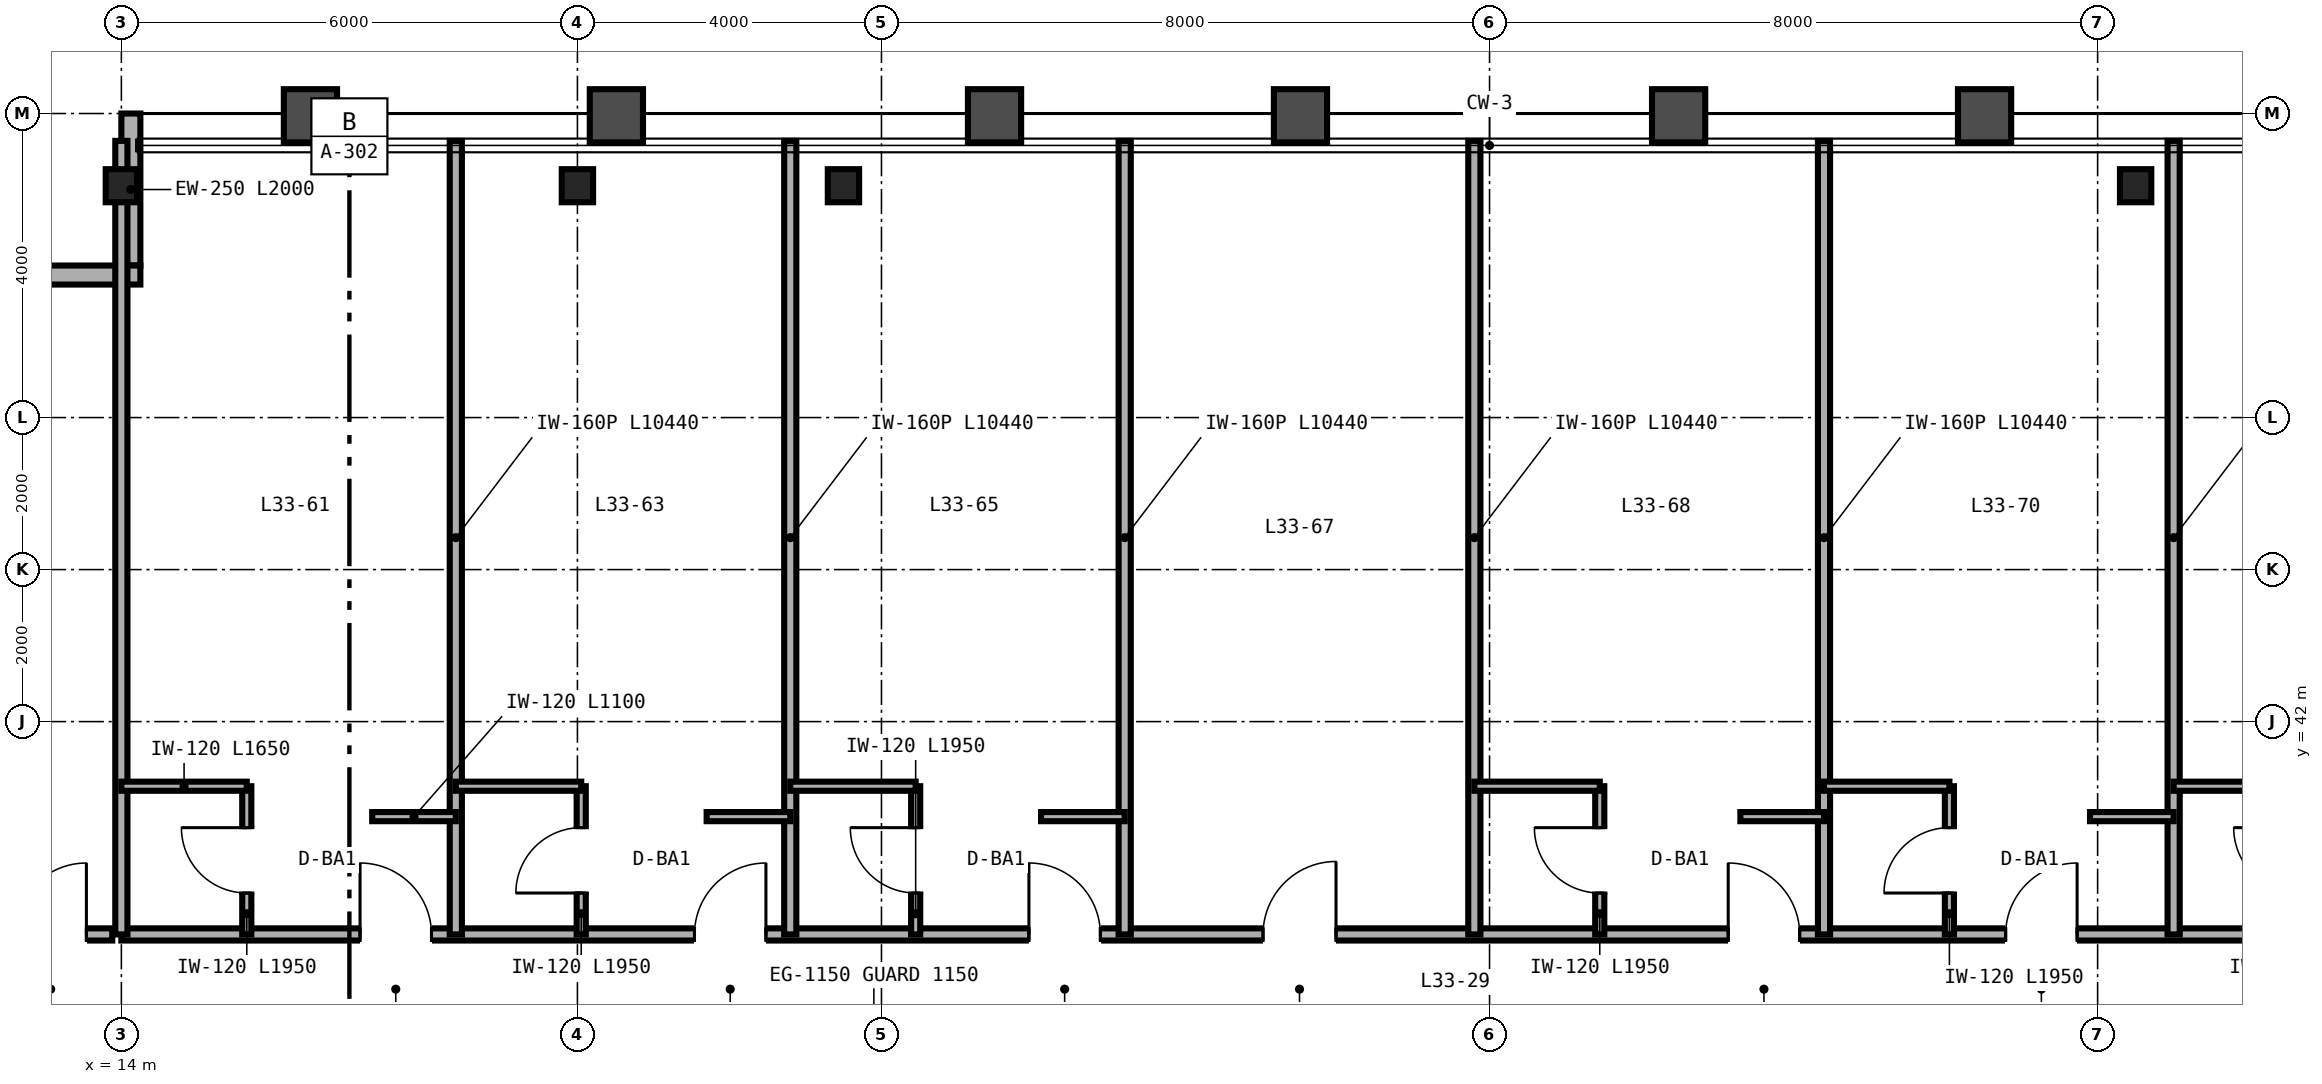
"""IFC4 building model, lengths in metres.
Left out: names, types, materials, properties, quantities, classifications, styles, units other than length and angle.
Written with IfcOpenShell. Run it as: python <this file> out.ifc"""

import sys

from ifc_helpers import new_model, si_unit, direction, frame, frame_2d, origin, origin_2d, place, context, subcontext, project, spatial, rectangle, i_section, extrude, source, transform, mapped, element, fill, save


model = new_model("IFC4")
c1 = context("Model", 3, precision=1e-05, world=origin(), true_north=direction((0.0, 1.0)))
c2 = subcontext(c1, "Body", "Model", "MODEL_VIEW")
j1 = project(units=[si_unit("LENGTHUNIT", "METRE"), si_unit("PLANEANGLEUNIT", "RADIAN")], contexts=[c1])
p1 = place(None, origin())
s1 = spatial("IfcSite", under=j1, at=p1, CompositionType="ELEMENT")
p2 = place(p1, origin())
s2 = spatial("IfcBuilding", under=s1, at=p2, CompositionType="ELEMENT")
p3 = place(p2, frame((0.0, 0.0, 133.2)))
s3 = spatial("IfcBuildingStorey", under=s2, at=p3, CompositionType="ELEMENT", Elevation=133.2)
m1 = source(origin(), c2, "Body", "SweptSolid", [
    extrude(i_section(OverallWidth=0.412, OverallDepth=0.435, WebThickness=0.036, FlangeThickness=0.057, FilletRadius=0.025, at=origin_2d()), origin(), (0.0, 0.0, 1.0), 3.36),
])
for number, where, z_axis, x_axis in (
    (1, (14.0, 49.05, 0.0), (0.0, 0.0, 1.0), (1.0, 0.0, 0.0)),
    (2, (20.0, 49.05, 0.0), (0.0, 0.0, 1.0), (1.0, 0.0, 0.0)),
    (3, (23.5, 49.05, 0.0), (0.0, 0.0, 1.0), (1.0, 0.0, 0.0)),
    (4, (40.5, 49.05, 0.0), (0.0, 0.0, 1.0), (1.0, 0.0, 0.0)),
):
    element("IfcColumn", number, at=place(p3, frame(where, z_axis=z_axis, x_axis=x_axis)), inside=s3, PredefinedType="COLUMN", context=c2, shape_type="MappedRepresentation", body=[
        mapped(m1, transform((0.0, 0.0, 0.0), scale=1.0)),
    ])
p4 = place(p3, frame((14.125, 50.0, 0.0), z_axis=(0.0, 0.0, 1.0), x_axis=(0.0, -1.0, 0.0)))
e5 = element("IfcWall", 5, at=p4, inside=s3, PredefinedType="SOLIDWALL", context=c2, shape_type="SweptSolid", body=[
    extrude(rectangle(XDim=2.0, YDim=0.25, at=frame_2d((1.0, 0.0))), origin(), (0.0, 0.0, 1.0), 2.667),
])
p5 = place(p3, frame((14.25, 47.875, 0.0), z_axis=(0.0, 0.0, 1.0), x_axis=(-1.0, 0.0, 0.0)))
e6 = element("IfcWall", 6, at=p5, inside=s3, PredefinedType="SOLIDWALL", context=c2, shape_type="SweptSolid", body=[
    extrude(rectangle(XDim=2.0, YDim=0.25, at=frame_2d((1.0, 0.0))), origin(), (0.0, 0.0, 1.0), 3.36),
])
p6 = place(p3, frame((8.2, 39.2, 0.0), z_axis=(0.0, 0.0, 1.0), x_axis=(1.0, 0.0, 0.0)))
e7 = element("IfcWall", 7, at=p6, inside=s3, PredefinedType="PARTITIONING", context=c2, shape_type="SweptSolid", body=[
    extrude(rectangle(XDim=5.68, YDim=0.16, at=frame_2d((2.84, 0.0))), origin(), (0.0, 0.0, 1.0), 3.36),
])
p7 = place(p6, frame((4.4, 0.0, 0.0)))
e8 = element("IfcOpeningElement", 8, at=p7, cuts=e7, PredefinedType="OPENING", context=c2, shape_type="SweptSolid", body=[
    extrude(rectangle(XDim=0.94, YDim=2.15, at=frame_2d((0.47, 1.075))), frame((0.0, 0.09, 0.0), z_axis=(0.0, -1.0, 0.0), x_axis=(1.0, 0.0, 0.0)), (0.0, 0.0, 1.0), 0.18),
])
p8 = place(p3, frame((14.0, 39.2, 0.0), z_axis=(0.0, 0.0, 1.0), x_axis=(1.0, 0.0, 0.0)))
e9 = element("IfcWall", 9, at=p8, inside=s3, PredefinedType="PARTITIONING", context=c2, shape_type="SweptSolid", body=[
    extrude(rectangle(XDim=36.0, YDim=0.16, at=frame_2d((18.0, 0.0))), origin(), (0.0, 0.0, 1.0), 2.581),
])
p9 = place(p8, frame((3.14, 0.0, 0.0)))
e10 = element("IfcOpeningElement", 10, at=p9, cuts=e9, PredefinedType="OPENING", context=c2, shape_type="SweptSolid", body=[
    extrude(rectangle(XDim=0.94, YDim=2.15, at=frame_2d((0.47, 1.075))), frame((0.0, 0.09, 0.0), z_axis=(0.0, -1.0, 0.0), x_axis=(1.0, 0.0, 0.0)), (0.0, 0.0, 1.0), 0.18),
])
p10 = place(p8, frame((7.54, 0.0, 0.0)))
e11 = element("IfcOpeningElement", 11, at=p10, cuts=e9, PredefinedType="OPENING", context=c2, shape_type="SweptSolid", body=[
    extrude(rectangle(XDim=0.94, YDim=2.15, at=frame_2d((0.47, 1.075))), frame((0.0, 0.09, 0.0), z_axis=(0.0, -1.0, 0.0), x_axis=(1.0, 0.0, 0.0)), (0.0, 0.0, 1.0), 0.18),
])
p11 = place(p8, frame((11.94, 0.0, 0.0)))
e12 = element("IfcOpeningElement", 12, at=p11, cuts=e9, PredefinedType="OPENING", context=c2, shape_type="SweptSolid", body=[
    extrude(rectangle(XDim=0.94, YDim=2.15, at=frame_2d((0.47, 1.075))), frame((0.0, 0.09, 0.0), z_axis=(0.0, -1.0, 0.0), x_axis=(1.0, 0.0, 0.0)), (0.0, 0.0, 1.0), 0.18),
])
p12 = place(p8, frame((15.02, 0.0, 0.0)))
e13 = element("IfcOpeningElement", 13, at=p12, cuts=e9, PredefinedType="OPENING", context=c2, shape_type="SweptSolid", body=[
    extrude(rectangle(XDim=0.96, YDim=2.15, at=frame_2d((0.48, 1.075))), frame((0.0, 0.09, 0.0), z_axis=(0.0, -1.0, 0.0), x_axis=(1.0, 0.0, 0.0)), (0.0, 0.0, 1.0), 0.18),
])
p13 = place(p8, frame((21.14, 0.0, 0.0)))
e14 = element("IfcOpeningElement", 14, at=p13, cuts=e9, PredefinedType="OPENING", context=c2, shape_type="SweptSolid", body=[
    extrude(rectangle(XDim=0.94, YDim=2.15, at=frame_2d((0.47, 1.075))), frame((0.0, 0.09, 0.0), z_axis=(0.0, -1.0, 0.0), x_axis=(1.0, 0.0, 0.0)), (0.0, 0.0, 1.0), 0.18),
])
p14 = place(p8, frame((24.79, 0.0, 0.0)))
e15 = element("IfcOpeningElement", 15, at=p14, cuts=e9, PredefinedType="OPENING", context=c2, shape_type="SweptSolid", body=[
    extrude(rectangle(XDim=0.94, YDim=2.15, at=frame_2d((0.47, 1.075))), frame((0.0, 0.09, 0.0), z_axis=(0.0, -1.0, 0.0), x_axis=(1.0, 0.0, 0.0)), (0.0, 0.0, 1.0), 0.18),
])
p15 = place(p8, frame((30.24, 0.0, 0.0)))
e16 = element("IfcOpeningElement", 16, at=p15, cuts=e9, PredefinedType="OPENING", context=c2, shape_type="SweptSolid", body=[
    extrude(rectangle(XDim=0.94, YDim=2.15, at=frame_2d((0.47, 1.075))), frame((0.0, 0.09, 0.0), z_axis=(0.0, -1.0, 0.0), x_axis=(1.0, 0.0, 0.0)), (0.0, 0.0, 1.0), 0.18),
])
p16 = place(p8, frame((34.74, 0.0, 0.0)))
e17 = element("IfcOpeningElement", 17, at=p16, cuts=e9, PredefinedType="OPENING", context=c2, shape_type="SweptSolid", body=[
    extrude(rectangle(XDim=0.94, YDim=2.15, at=frame_2d((0.47, 1.075))), frame((0.0, 0.09, 0.0), z_axis=(0.0, -1.0, 0.0), x_axis=(1.0, 0.0, 0.0)), (0.0, 0.0, 1.0), 0.18),
])
for number, where, z_axis, x_axis in (
    (18, (14.0, 39.2, 0.0), (0.0, 0.0, 1.0), (0.0, 1.0, 0.0)),
    (19, (18.4, 39.2, 0.0), (0.0, 0.0, 1.0), (0.0, 1.0, 0.0)),
):
    element("IfcWall", number, at=place(p3, frame(where, z_axis=z_axis, x_axis=x_axis)), inside=s3, PredefinedType="PARTITIONING", context=c2, shape_type="SweptSolid", body=[
        extrude(rectangle(XDim=10.44, YDim=0.16, at=frame_2d((5.22, 0.0))), origin(), (0.0, 0.0, 1.0), 2.667),
    ])
p17 = place(p3, frame((15.65, 39.2, 0.0), z_axis=(0.0, 0.0, 1.0), x_axis=(0.0, 1.0, 0.0)))
e20 = element("IfcWall", 20, at=p17, inside=s3, PredefinedType="PARTITIONING", context=c2, shape_type="SweptSolid", body=[
    extrude(rectangle(XDim=1.95, YDim=0.12, at=frame_2d((0.975, 0.0))), origin(), (0.0, 0.0, 1.0), 3.36),
])
p18 = place(p17, frame((0.545, 0.0, 0.0)))
e21 = element("IfcOpeningElement", 21, at=p18, cuts=e20, PredefinedType="OPENING", context=c2, shape_type="SweptSolid", body=[
    extrude(rectangle(XDim=0.86, YDim=2.1, at=frame_2d((0.43, 1.05))), frame((0.0, 0.07, 0.0), z_axis=(0.0, -1.0, 0.0), x_axis=(1.0, 0.0, 0.0)), (0.0, 0.0, 1.0), 0.14),
])
p19 = place(p3, frame((14.0, 41.15, 0.0), z_axis=(0.0, 0.0, 1.0), x_axis=(1.0, 0.0, 0.0)))
e22 = element("IfcWall", 22, at=p19, inside=s3, PredefinedType="PARTITIONING", context=c2, shape_type="SweptSolid", body=[
    extrude(rectangle(XDim=1.65, YDim=0.12, at=frame_2d((0.825, 0.0))), origin(), (0.0, 0.0, 1.0), 3.36),
])
p20 = place(p3, frame((17.3, 40.75, 0.0), z_axis=(0.0, 0.0, 1.0), x_axis=(1.0, 0.0, 0.0)))
e23 = element("IfcWall", 23, at=p20, inside=s3, PredefinedType="PARTITIONING", context=c2, shape_type="SweptSolid", body=[
    extrude(rectangle(XDim=1.1, YDim=0.12, at=frame_2d((0.55, 0.0))), origin(), (0.0, 0.0, 1.0), 3.36),
])
p21 = place(p3, frame((22.8, 39.2, 0.0), z_axis=(0.0, 0.0, 1.0), x_axis=(0.0, 1.0, 0.0)))
e24 = element("IfcWall", 24, at=p21, inside=s3, PredefinedType="PARTITIONING", context=c2, shape_type="SweptSolid", body=[
    extrude(rectangle(XDim=10.44, YDim=0.16, at=frame_2d((5.22, 0.0))), origin(), (0.0, 0.0, 1.0), 2.823),
])
p22 = place(p3, frame((20.05, 39.2, 0.0), z_axis=(0.0, 0.0, 1.0), x_axis=(0.0, 1.0, 0.0)))
e25 = element("IfcWall", 25, at=p22, inside=s3, PredefinedType="PARTITIONING", context=c2, shape_type="SweptSolid", body=[
    extrude(rectangle(XDim=1.95, YDim=0.12, at=frame_2d((0.975, 0.0))), origin(), (0.0, 0.0, 1.0), 3.36),
])
p23 = place(p22, frame((0.545, 0.0, 0.0)))
e26 = element("IfcOpeningElement", 26, at=p23, cuts=e25, PredefinedType="OPENING", context=c2, shape_type="SweptSolid", body=[
    extrude(rectangle(XDim=0.86, YDim=2.1, at=frame_2d((0.43, 1.05))), frame((0.0, 0.07, 0.0), z_axis=(0.0, -1.0, 0.0), x_axis=(1.0, 0.0, 0.0)), (0.0, 0.0, 1.0), 0.14),
])
p24 = place(p3, frame((18.4, 41.15, 0.0), z_axis=(0.0, 0.0, 1.0), x_axis=(1.0, 0.0, 0.0)))
e27 = element("IfcWall", 27, at=p24, inside=s3, PredefinedType="PARTITIONING", context=c2, shape_type="SweptSolid", body=[
    extrude(rectangle(XDim=1.65, YDim=0.12, at=frame_2d((0.825, 0.0))), origin(), (0.0, 0.0, 1.0), 3.36),
])
p25 = place(p3, frame((21.7, 40.75, 0.0), z_axis=(0.0, 0.0, 1.0), x_axis=(1.0, 0.0, 0.0)))
e28 = element("IfcWall", 28, at=p25, inside=s3, PredefinedType="PARTITIONING", context=c2, shape_type="SweptSolid", body=[
    extrude(rectangle(XDim=1.1, YDim=0.12, at=frame_2d((0.55, 0.0))), origin(), (0.0, 0.0, 1.0), 3.36),
])
p26 = place(p3, frame((27.2, 39.2, 0.0), z_axis=(0.0, 0.0, 1.0), x_axis=(0.0, 1.0, 0.0)))
e29 = element("IfcWall", 29, at=p26, inside=s3, PredefinedType="PARTITIONING", context=c2, shape_type="SweptSolid", body=[
    extrude(rectangle(XDim=10.44, YDim=0.16, at=frame_2d((5.22, 0.0))), origin(), (0.0, 0.0, 1.0), 2.433),
])
p27 = place(p3, frame((24.45, 39.2, 0.0), z_axis=(0.0, 0.0, 1.0), x_axis=(0.0, 1.0, 0.0)))
e30 = element("IfcWall", 30, at=p27, inside=s3, PredefinedType="PARTITIONING", context=c2, shape_type="SweptSolid", body=[
    extrude(rectangle(XDim=1.95, YDim=0.12, at=frame_2d((0.975, 0.0))), origin(), (0.0, 0.0, 1.0), 3.36),
])
p28 = place(p27, frame((0.545, 0.0, 0.0)))
e31 = element("IfcOpeningElement", 31, at=p28, cuts=e30, PredefinedType="OPENING", context=c2, shape_type="SweptSolid", body=[
    extrude(rectangle(XDim=0.86, YDim=2.1, at=frame_2d((0.43, 1.05))), frame((0.0, 0.07, 0.0), z_axis=(0.0, -1.0, 0.0), x_axis=(1.0, 0.0, 0.0)), (0.0, 0.0, 1.0), 0.14),
])
p29 = place(p3, frame((22.8, 41.15, 0.0), z_axis=(0.0, 0.0, 1.0), x_axis=(1.0, 0.0, 0.0)))
e32 = element("IfcWall", 32, at=p29, inside=s3, PredefinedType="PARTITIONING", context=c2, shape_type="SweptSolid", body=[
    extrude(rectangle(XDim=1.65, YDim=0.12, at=frame_2d((0.825, 0.0))), origin(), (0.0, 0.0, 1.0), 2.581),
])
p30 = place(p3, frame((26.1, 40.75, 0.0), z_axis=(0.0, 0.0, 1.0), x_axis=(1.0, 0.0, 0.0)))
e33 = element("IfcWall", 33, at=p30, inside=s3, PredefinedType="PARTITIONING", context=c2, shape_type="SweptSolid", body=[
    extrude(rectangle(XDim=1.1, YDim=0.12, at=frame_2d((0.55, 0.0))), origin(), (0.0, 0.0, 1.0), 3.36),
])
for number, where, z_axis, x_axis in (
    (34, (31.8, 39.2, 0.0), (0.0, 0.0, 1.0), (0.0, 1.0, 0.0)),
    (35, (36.4, 39.2, 0.0), (0.0, 0.0, 1.0), (0.0, 1.0, 0.0)),
):
    element("IfcWall", number, at=place(p3, frame(where, z_axis=z_axis, x_axis=x_axis)), inside=s3, PredefinedType="PARTITIONING", context=c2, shape_type="SweptSolid", body=[
        extrude(rectangle(XDim=10.44, YDim=0.16, at=frame_2d((5.22, 0.0))), origin(), (0.0, 0.0, 1.0), 2.433),
    ])
p31 = place(p3, frame((33.45, 39.2, 0.0), z_axis=(0.0, 0.0, 1.0), x_axis=(0.0, 1.0, 0.0)))
e36 = element("IfcWall", 36, at=p31, inside=s3, PredefinedType="PARTITIONING", context=c2, shape_type="SweptSolid", body=[
    extrude(rectangle(XDim=1.95, YDim=0.12, at=frame_2d((0.975, 0.0))), origin(), (0.0, 0.0, 1.0), 3.36),
])
p32 = place(p31, frame((0.545, 0.0, 0.0)))
e37 = element("IfcOpeningElement", 37, at=p32, cuts=e36, PredefinedType="OPENING", context=c2, shape_type="SweptSolid", body=[
    extrude(rectangle(XDim=0.86, YDim=2.1, at=frame_2d((0.43, 1.05))), frame((0.0, 0.07, 0.0), z_axis=(0.0, -1.0, 0.0), x_axis=(1.0, 0.0, 0.0)), (0.0, 0.0, 1.0), 0.14),
])
p33 = place(p3, frame((31.8, 41.15, 0.0), z_axis=(0.0, 0.0, 1.0), x_axis=(1.0, 0.0, 0.0)))
e38 = element("IfcWall", 38, at=p33, inside=s3, PredefinedType="PARTITIONING", context=c2, shape_type="SweptSolid", body=[
    extrude(rectangle(XDim=1.65, YDim=0.12, at=frame_2d((0.825, 0.0))), origin(), (0.0, 0.0, 1.0), 3.36),
])
p34 = place(p3, frame((35.3, 40.75, 0.0), z_axis=(0.0, 0.0, 1.0), x_axis=(1.0, 0.0, 0.0)))
e39 = element("IfcWall", 39, at=p34, inside=s3, PredefinedType="PARTITIONING", context=c2, shape_type="SweptSolid", body=[
    extrude(rectangle(XDim=1.1, YDim=0.12, at=frame_2d((0.55, 0.0))), origin(), (0.0, 0.0, 1.0), 3.36),
])
p35 = place(p3, frame((41.0, 39.2, 0.0), z_axis=(0.0, 0.0, 1.0), x_axis=(0.0, 1.0, 0.0)))
e40 = element("IfcWall", 40, at=p35, inside=s3, PredefinedType="PARTITIONING", context=c2, shape_type="SweptSolid", body=[
    extrude(rectangle(XDim=10.44, YDim=0.16, at=frame_2d((5.22, 0.0))), origin(), (0.0, 0.0, 1.0), 2.823),
])
p36 = place(p3, frame((38.05, 39.2, 0.0), z_axis=(0.0, 0.0, 1.0), x_axis=(0.0, 1.0, 0.0)))
e41 = element("IfcWall", 41, at=p36, inside=s3, PredefinedType="PARTITIONING", context=c2, shape_type="SweptSolid", body=[
    extrude(rectangle(XDim=1.95, YDim=0.12, at=frame_2d((0.975, 0.0))), origin(), (0.0, 0.0, 1.0), 3.36),
])
p37 = place(p36, frame((0.545, 0.0, 0.0)))
e42 = element("IfcOpeningElement", 42, at=p37, cuts=e41, PredefinedType="OPENING", context=c2, shape_type="SweptSolid", body=[
    extrude(rectangle(XDim=0.86, YDim=2.1, at=frame_2d((0.43, 1.05))), frame((0.0, 0.07, 0.0), z_axis=(0.0, -1.0, 0.0), x_axis=(1.0, 0.0, 0.0)), (0.0, 0.0, 1.0), 0.14),
])
p38 = place(p3, frame((36.4, 41.15, 0.0), z_axis=(0.0, 0.0, 1.0), x_axis=(1.0, 0.0, 0.0)))
e43 = element("IfcWall", 43, at=p38, inside=s3, PredefinedType="PARTITIONING", context=c2, shape_type="SweptSolid", body=[
    extrude(rectangle(XDim=1.65, YDim=0.12, at=frame_2d((0.825, 0.0))), origin(), (0.0, 0.0, 1.0), 3.36),
])
p39 = place(p3, frame((39.9, 40.75, 0.0), z_axis=(0.0, 0.0, 1.0), x_axis=(1.0, 0.0, 0.0)))
e44 = element("IfcWall", 44, at=p39, inside=s3, PredefinedType="PARTITIONING", context=c2, shape_type="SweptSolid", body=[
    extrude(rectangle(XDim=1.1, YDim=0.12, at=frame_2d((0.55, 0.0))), origin(), (0.0, 0.0, 1.0), 2.581),
])
p40 = place(p3, frame((41.0, 41.15, 0.0), z_axis=(0.0, 0.0, 1.0), x_axis=(1.0, 0.0, 0.0)))
e45 = element("IfcWall", 45, at=p40, inside=s3, PredefinedType="PARTITIONING", context=c2, shape_type="SweptSolid", body=[
    extrude(rectangle(XDim=1.65, YDim=0.12, at=frame_2d((0.825, 0.0))), origin(), (0.0, 0.0, 1.0), 3.36),
])
m2 = source(origin(), c2, "Body", "SweptSolid", [
    extrude(rectangle(XDim=0.94, YDim=2.15, at=frame_2d((0.47, 1.075))), frame((0.0, 0.025, 0.0), z_axis=(0.0, -1.0, 0.0), x_axis=(1.0, 0.0, 0.0)), (0.0, 0.0, 1.0), 0.05),
])
p41 = place(p7, origin())
e46 = element("IfcDoor", 46, at=p41, inside=s3, OperationType="SINGLE_SWING_RIGHT", PredefinedType="DOOR", context=c2, shape_type="MappedRepresentation", body=[
    mapped(m2, transform((0.0, 0.0, 0.0), scale=1.0)),
])
fill(e8, e46)
m3 = source(origin(), c2, "Body", "SweptSolid", [
    extrude(rectangle(XDim=0.86, YDim=2.1, at=frame_2d((0.43, 1.05))), frame((0.0, 0.025, 0.0), z_axis=(0.0, -1.0, 0.0), x_axis=(1.0, 0.0, 0.0)), (0.0, 0.0, 1.0), 0.05),
])
p42 = place(p18, origin())
e47 = element("IfcDoor", 47, at=p42, inside=s3, OperationType="SINGLE_SWING_RIGHT", PredefinedType="DOOR", context=c2, shape_type="MappedRepresentation", body=[
    mapped(m3, transform((0.0, 0.0, 0.0), scale=1.0)),
])
fill(e21, e47)
p43 = place(p23, origin())
e48 = element("IfcDoor", 48, at=p43, inside=s3, OperationType="SINGLE_SWING_LEFT", PredefinedType="DOOR", context=c2, shape_type="MappedRepresentation", body=[
    mapped(m3, transform((0.0, 0.0, 0.0), scale=1.0)),
])
fill(e26, e48)
p44 = place(p28, origin())
e49 = element("IfcDoor", 49, at=p44, inside=s3, OperationType="SINGLE_SWING_RIGHT", PredefinedType="DOOR", context=c2, shape_type="MappedRepresentation", body=[
    mapped(m3, transform((0.0, 0.0, 0.0), scale=1.0)),
])
fill(e31, e49)
p45 = place(p32, origin())
e50 = element("IfcDoor", 50, at=p45, inside=s3, OperationType="SINGLE_SWING_RIGHT", PredefinedType="DOOR", context=c2, shape_type="MappedRepresentation", body=[
    mapped(m3, transform((0.0, 0.0, 0.0), scale=1.0)),
])
fill(e37, e50)
p46 = place(p37, origin())
e51 = element("IfcDoor", 51, at=p46, inside=s3, OperationType="SINGLE_SWING_LEFT", PredefinedType="DOOR", context=c2, shape_type="MappedRepresentation", body=[
    mapped(m3, transform((0.0, 0.0, 0.0), scale=1.0)),
])
fill(e42, e51)
p47 = place(p9, origin())
e52 = element("IfcDoor", 52, at=p47, inside=s3, OperationType="SINGLE_SWING_LEFT", PredefinedType="DOOR", context=c2, shape_type="MappedRepresentation", body=[
    mapped(m2, transform((0.0, 0.0, 0.0), scale=1.0)),
])
fill(e10, e52)
p48 = place(p10, origin())
e53 = element("IfcDoor", 53, at=p48, inside=s3, OperationType="SINGLE_SWING_RIGHT", PredefinedType="DOOR", context=c2, shape_type="MappedRepresentation", body=[
    mapped(m2, transform((0.0, 0.0, 0.0), scale=1.0)),
])
fill(e11, e53)
p49 = place(p11, origin())
e54 = element("IfcDoor", 54, at=p49, inside=s3, OperationType="SINGLE_SWING_LEFT", PredefinedType="DOOR", context=c2, shape_type="MappedRepresentation", body=[
    mapped(m2, transform((0.0, 0.0, 0.0), scale=1.0)),
])
fill(e12, e54)
m4 = source(origin(), c2, "Body", "SweptSolid", [
    extrude(rectangle(XDim=0.96, YDim=2.15, at=frame_2d((0.48, 1.075))), frame((0.0, 0.025, 0.0), z_axis=(0.0, -1.0, 0.0), x_axis=(1.0, 0.0, 0.0)), (0.0, 0.0, 1.0), 0.05),
])
p50 = place(p12, origin())
e55 = element("IfcDoor", 55, at=p50, inside=s3, OperationType="SINGLE_SWING_RIGHT", PredefinedType="DOOR", context=c2, shape_type="MappedRepresentation", body=[
    mapped(m4, transform((0.0, 0.0, 0.0), scale=1.0)),
])
fill(e13, e55)
p51 = place(p13, origin())
e56 = element("IfcDoor", 56, at=p51, inside=s3, OperationType="SINGLE_SWING_LEFT", PredefinedType="DOOR", context=c2, shape_type="MappedRepresentation", body=[
    mapped(m2, transform((0.0, 0.0, 0.0), scale=1.0)),
])
fill(e14, e56)
p52 = place(p14, origin())
e57 = element("IfcDoor", 57, at=p52, inside=s3, OperationType="SINGLE_SWING_RIGHT", PredefinedType="DOOR", context=c2, shape_type="MappedRepresentation", body=[
    mapped(m2, transform((0.0, 0.0, 0.0), scale=1.0)),
])
fill(e15, e57)
save(model, sys.argv[1])
